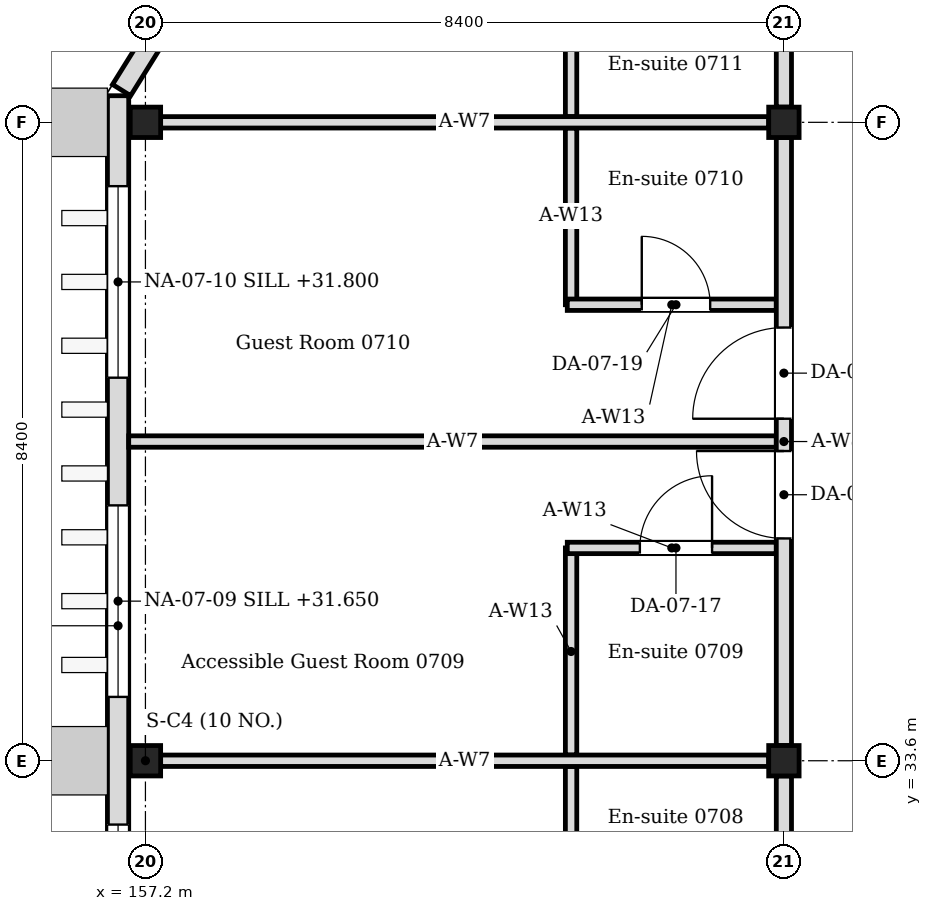
"""IFC4 building model, lengths in metres.
Left out: names, types, materials, properties, quantities, classifications, styles, units other than length and angle.
Written with IfcOpenShell. Run it as: python <this file> out.ifc"""

import sys

from ifc_helpers import new_model, si_unit, direction, frame, frame_2d, origin, origin_2d, place, context, subcontext, project, spatial, rectangle, i_section, extrude, element, fill, save


model = new_model("IFC4")
c1 = context("Model", 3, precision=1e-05, world=origin(), true_north=direction((0.0, 1.0)))
c2 = subcontext(c1, "Body", "Model", "MODEL_VIEW")
j1 = project(units=[si_unit("LENGTHUNIT", "METRE"), si_unit("PLANEANGLEUNIT", "RADIAN")], contexts=[c1])
p1 = place(None, origin())
s1 = spatial("IfcSite", under=j1, at=p1, CompositionType="ELEMENT")
p2 = place(p1, origin())
s2 = spatial("IfcBuilding", under=s1, at=p2, CompositionType="ELEMENT")
p3 = place(p2, frame((0.0, 0.0, 31.2)))
s3 = spatial("IfcBuildingStorey", under=s2, at=p3, CompositionType="ELEMENT", Elevation=31.2)
for number, where, z_axis, x_axis in (
    (1, (157.2, 33.6, 0.0), (0.0, 0.0, 1.0), (1.0, 0.0, 0.0)),
    (2, (157.2, 42.0, 0.0), (0.0, 0.0, 1.0), (1.0, 0.0, 0.0)),
    (3, (165.6, 33.6, 0.0), (0.0, 0.0, 1.0), (1.0, 0.0, 0.0)),
    (4, (165.6, 42.0, 0.0), (0.0, 0.0, 1.0), (1.0, 0.0, 0.0)),
):
    element("IfcColumn", number, at=place(p3, frame(where, z_axis=z_axis, x_axis=x_axis)), inside=s3, PredefinedType="COLUMN", context=c2, shape_type="SweptSolid", body=[
        extrude(i_section(OverallWidth=0.4, OverallDepth=0.4, WebThickness=0.013, FlangeThickness=0.021, FilletRadius=0.022, at=origin_2d()), origin(), (0.0, 0.0, 1.0), 4.2),
    ])
p4 = place(p3, frame((156.84, 16.45, 0.0), z_axis=(0.0, 0.0, 1.0), x_axis=(0.0, 1.0, 0.0)))
e5 = element("IfcWall", 5, at=p4, inside=s3, PredefinedType="SOLIDWALL", context=c2, shape_type="SweptSolid", body=[
    extrude(rectangle(XDim=25.9, YDim=0.28, at=frame_2d((12.95, 0.0))), origin(), (0.0, 0.0, 1.0), 4.05),
])
p5 = place(p4, frame((1.19, 0.0, 0.6)))
e6 = element("IfcOpeningElement", 6, at=p5, cuts=e5, PredefinedType="OPENING", context=c2, shape_type="SweptSolid", body=[
    extrude(rectangle(XDim=2.52, YDim=2.4, at=frame_2d((1.26, 1.2))), frame((0.0, 0.15, 0.0), z_axis=(0.0, -1.0, 0.0), x_axis=(1.0, 0.0, 0.0)), (0.0, 0.0, 1.0), 0.3),
])
p6 = place(p4, frame((5.39, 0.0, 0.6)))
e7 = element("IfcOpeningElement", 7, at=p6, cuts=e5, PredefinedType="OPENING", context=c2, shape_type="SweptSolid", body=[
    extrude(rectangle(XDim=2.52, YDim=2.4, at=frame_2d((1.26, 1.2))), frame((0.0, 0.15, 0.0), z_axis=(0.0, -1.0, 0.0), x_axis=(1.0, 0.0, 0.0)), (0.0, 0.0, 1.0), 0.3),
])
p7 = place(p4, frame((9.59, 0.0, 0.6)))
e8 = element("IfcOpeningElement", 8, at=p7, cuts=e5, PredefinedType="OPENING", context=c2, shape_type="SweptSolid", body=[
    extrude(rectangle(XDim=2.52, YDim=2.4, at=frame_2d((1.26, 1.2))), frame((0.0, 0.15, 0.0), z_axis=(0.0, -1.0, 0.0), x_axis=(1.0, 0.0, 0.0)), (0.0, 0.0, 1.0), 0.3),
])
p8 = place(p4, frame((13.79, 0.0, 0.6)))
e9 = element("IfcOpeningElement", 9, at=p8, cuts=e5, PredefinedType="OPENING", context=c2, shape_type="SweptSolid", body=[
    extrude(rectangle(XDim=2.52, YDim=2.4, at=frame_2d((1.26, 1.2))), frame((0.0, 0.15, 0.0), z_axis=(0.0, -1.0, 0.0), x_axis=(1.0, 0.0, 0.0)), (0.0, 0.0, 1.0), 0.3),
])
p9 = place(p4, frame((17.99, 0.0, 0.45)))
e10 = element("IfcOpeningElement", 10, at=p9, cuts=e5, PredefinedType="OPENING", context=c2, shape_type="SweptSolid", body=[
    extrude(rectangle(XDim=2.52, YDim=2.1, at=frame_2d((1.26, 1.05))), frame((0.0, 0.15, 0.0), z_axis=(0.0, -1.0, 0.0), x_axis=(1.0, 0.0, 0.0)), (0.0, 0.0, 1.0), 0.3),
])
p10 = place(p4, frame((22.19, 0.0, 0.6)))
e11 = element("IfcOpeningElement", 11, at=p10, cuts=e5, PredefinedType="OPENING", context=c2, shape_type="SweptSolid", body=[
    extrude(rectangle(XDim=2.52, YDim=2.4, at=frame_2d((1.26, 1.2))), frame((0.0, 0.15, 0.0), z_axis=(0.0, -1.0, 0.0), x_axis=(1.0, 0.0, 0.0)), (0.0, 0.0, 1.0), 0.3),
])
p11 = place(p3, frame((156.886, 42.424, 0.0), z_axis=(0.0, 0.0, 1.0), x_axis=(0.529018946142, 0.848610013271, 0.0)))
e12 = element("IfcWall", 12, at=p11, inside=s3, PredefinedType="SOLIDWALL", context=c2, shape_type="SweptSolid", body=[
    extrude(rectangle(XDim=4.144, YDim=0.28, at=frame_2d((2.072, 0.0))), origin(), (0.0, 0.0, 1.0), 4.05),
])
p12 = place(p11, frame((0.812, 0.0, 0.6)))
e13 = element("IfcOpeningElement", 13, at=p12, cuts=e12, PredefinedType="OPENING", context=c2, shape_type="SweptSolid", body=[
    extrude(rectangle(XDim=2.52, YDim=2.4, at=frame_2d((1.26, 1.2))), frame((0.0, 0.15, 0.0), z_axis=(0.0, -1.0, 0.0), x_axis=(1.0, 0.0, 0.0)), (0.0, 0.0, 1.0), 0.3),
])
p13 = place(p3, frame((162.8, 31.2, 0.0), z_axis=(0.0, 0.0, 1.0), x_axis=(0.0, 1.0, 0.0)))
e14 = element("IfcWall", 14, at=p13, inside=s3, PredefinedType="PARTITIONING", context=c2, shape_type="SweptSolid", body=[
    extrude(rectangle(XDim=2.325, YDim=0.15, at=frame_2d((1.163, 0.0))), origin(), (0.0, 0.0, 1.0), 4.05),
])
p14 = place(p3, frame((162.8, 33.675, 0.0), z_axis=(0.0, 0.0, 1.0), x_axis=(0.0, 1.0, 0.0)))
e15 = element("IfcWall", 15, at=p14, inside=s3, PredefinedType="PARTITIONING", context=c2, shape_type="SweptSolid", body=[
    extrude(rectangle(XDim=2.725, YDim=0.15, at=frame_2d((1.362, 0.0))), origin(), (0.0, 0.0, 1.0), 4.05),
])
p15 = place(p3, frame((162.75, 36.4, 0.0), z_axis=(0.0, 0.0, 1.0), x_axis=(1.0, 0.0, 0.0)))
e16 = element("IfcWall", 16, at=p15, inside=s3, PredefinedType="PARTITIONING", context=c2, shape_type="SweptSolid", body=[
    extrude(rectangle(XDim=2.75, YDim=0.15, at=frame_2d((1.375, 0.0))), origin(), (0.0, 0.0, 1.0), 4.05),
])
p16 = place(p15, frame((0.955, 0.0, 0.0)))
e17 = element("IfcOpeningElement", 17, at=p16, cuts=e16, PredefinedType="OPENING", context=c2, shape_type="SweptSolid", body=[
    extrude(rectangle(XDim=0.95, YDim=2.1, at=frame_2d((0.475, 1.05))), frame((0.0, 0.085, 0.0), z_axis=(0.0, -1.0, 0.0), x_axis=(1.0, 0.0, 0.0)), (0.0, 0.0, 1.0), 0.17),
])
p17 = place(p3, frame((162.8, 39.6, 0.0), z_axis=(0.0, 0.0, 1.0), x_axis=(0.0, 1.0, 0.0)))
e18 = element("IfcWall", 18, at=p17, inside=s3, PredefinedType="PARTITIONING", context=c2, shape_type="SweptSolid", body=[
    extrude(rectangle(XDim=2.325, YDim=0.15, at=frame_2d((1.163, 0.0))), origin(), (0.0, 0.0, 1.0), 4.05),
])
p18 = place(p3, frame((162.75, 39.6, 0.0), z_axis=(0.0, 0.0, 1.0), x_axis=(1.0, 0.0, 0.0)))
e19 = element("IfcWall", 19, at=p18, inside=s3, PredefinedType="PARTITIONING", context=c2, shape_type="SweptSolid", body=[
    extrude(rectangle(XDim=2.75, YDim=0.15, at=frame_2d((1.375, 0.0))), origin(), (0.0, 0.0, 1.0), 4.05),
])
p19 = place(p18, frame((0.98, 0.0, 0.0)))
e20 = element("IfcOpeningElement", 20, at=p19, cuts=e19, PredefinedType="OPENING", context=c2, shape_type="SweptSolid", body=[
    extrude(rectangle(XDim=0.9, YDim=2.1, at=frame_2d((0.45, 1.05))), frame((0.0, 0.085, 0.0), z_axis=(0.0, -1.0, 0.0), x_axis=(1.0, 0.0, 0.0)), (0.0, 0.0, 1.0), 0.17),
])
p20 = place(p3, frame((162.8, 42.075, 0.0), z_axis=(0.0, 0.0, 1.0), x_axis=(0.0, 1.0, 0.0)))
e21 = element("IfcWall", 21, at=p20, inside=s3, PredefinedType="PARTITIONING", context=c2, shape_type="SweptSolid", body=[
    extrude(rectangle(XDim=2.325, YDim=0.15, at=frame_2d((1.163, 0.0))), origin(), (0.0, 0.0, 1.0), 4.05),
])
for number, where, z_axis, x_axis in (
    (22, (157.4, 33.6, 0.0), (0.0, 0.0, 1.0), (1.0, 0.0, 0.0)),
    (23, (157.4, 42.0, 0.0), (0.0, 0.0, 1.0), (1.0, 0.0, 0.0)),
):
    element("IfcWall", number, at=place(p3, frame(where, z_axis=z_axis, x_axis=x_axis)), inside=s3, PredefinedType="PARTITIONING", context=c2, shape_type="SweptSolid", body=[
        extrude(rectangle(XDim=8.0, YDim=0.15, at=frame_2d((4.0, 0.0))), origin(), (0.0, 0.0, 1.0), 3.604),
    ])
p21 = place(p3, frame((156.98, 37.8, 0.0), z_axis=(0.0, 0.0, 1.0), x_axis=(1.0, 0.0, 0.0)))
e24 = element("IfcWall", 24, at=p21, inside=s3, PredefinedType="PARTITIONING", context=c2, shape_type="SweptSolid", body=[
    extrude(rectangle(XDim=8.52, YDim=0.15, at=frame_2d((4.26, 0.0))), origin(), (0.0, 0.0, 1.0), 3.604),
])
p22 = place(p3, frame((165.6, 25.4, 0.0), z_axis=(0.0, 0.0, 1.0), x_axis=(0.0, 1.0, 0.0)))
e25 = element("IfcWall", 25, at=p22, inside=s3, PredefinedType="PARTITIONING", context=c2, shape_type="SweptSolid", body=[
    extrude(rectangle(XDim=8.0, YDim=0.2, at=frame_2d((4.0, 0.0))), origin(), (0.0, 0.0, 1.0), 3.45),
])
p23 = place(p22, frame((2.5, 0.0, 0.0)))
e26 = element("IfcOpeningElement", 26, at=p23, cuts=e25, PredefinedType="OPENING", context=c2, shape_type="SweptSolid", body=[
    extrude(rectangle(XDim=1.2, YDim=2.1, at=frame_2d((0.6, 1.05))), frame((0.0, 0.11, 0.0), z_axis=(0.0, -1.0, 0.0), x_axis=(1.0, 0.0, 0.0)), (0.0, 0.0, 1.0), 0.22),
])
p24 = place(p22, frame((4.3, 0.0, 0.0)))
e27 = element("IfcOpeningElement", 27, at=p24, cuts=e25, PredefinedType="OPENING", context=c2, shape_type="SweptSolid", body=[
    extrude(rectangle(XDim=1.2, YDim=2.1, at=frame_2d((0.6, 1.05))), frame((0.0, 0.11, 0.0), z_axis=(0.0, -1.0, 0.0), x_axis=(1.0, 0.0, 0.0)), (0.0, 0.0, 1.0), 0.22),
])
p25 = place(p3, frame((165.6, 33.8, 0.0), z_axis=(0.0, 0.0, 1.0), x_axis=(0.0, 1.0, 0.0)))
e28 = element("IfcWall", 28, at=p25, inside=s3, PredefinedType="PARTITIONING", context=c2, shape_type="SweptSolid", body=[
    extrude(rectangle(XDim=8.0, YDim=0.2, at=frame_2d((4.0, 0.0))), origin(), (0.0, 0.0, 1.0), 3.45),
])
p26 = place(p25, frame((2.725, 0.0, 0.0)))
e29 = element("IfcOpeningElement", 29, at=p26, cuts=e28, PredefinedType="OPENING", context=c2, shape_type="SweptSolid", body=[
    extrude(rectangle(XDim=1.15, YDim=2.1, at=frame_2d((0.575, 1.05))), frame((0.0, 0.11, 0.0), z_axis=(0.0, -1.0, 0.0), x_axis=(1.0, 0.0, 0.0)), (0.0, 0.0, 1.0), 0.22),
])
p27 = place(p25, frame((4.3, 0.0, 0.0)))
e30 = element("IfcOpeningElement", 30, at=p27, cuts=e28, PredefinedType="OPENING", context=c2, shape_type="SweptSolid", body=[
    extrude(rectangle(XDim=1.2, YDim=2.1, at=frame_2d((0.6, 1.05))), frame((0.0, 0.11, 0.0), z_axis=(0.0, -1.0, 0.0), x_axis=(1.0, 0.0, 0.0)), (0.0, 0.0, 1.0), 0.22),
])
p28 = place(p3, frame((165.6, 42.2, 0.0), z_axis=(0.0, 0.0, 1.0), x_axis=(0.0, 1.0, 0.0)))
e31 = element("IfcWall", 31, at=p28, inside=s3, PredefinedType="PARTITIONING", context=c2, shape_type="SweptSolid", body=[
    extrude(rectangle(XDim=8.0, YDim=0.2, at=frame_2d((4.0, 0.0))), origin(), (0.0, 0.0, 1.0), 3.45),
])
p29 = place(p28, frame((2.5, 0.0, 0.0)))
e32 = element("IfcOpeningElement", 32, at=p29, cuts=e31, PredefinedType="OPENING", context=c2, shape_type="SweptSolid", body=[
    extrude(rectangle(XDim=1.2, YDim=2.1, at=frame_2d((0.6, 1.05))), frame((0.0, 0.11, 0.0), z_axis=(0.0, -1.0, 0.0), x_axis=(1.0, 0.0, 0.0)), (0.0, 0.0, 1.0), 0.22),
])
p30 = place(p28, frame((4.3, 0.0, 0.0)))
e33 = element("IfcOpeningElement", 33, at=p30, cuts=e31, PredefinedType="OPENING", context=c2, shape_type="SweptSolid", body=[
    extrude(rectangle(XDim=1.2, YDim=2.1, at=frame_2d((0.6, 1.05))), frame((0.0, 0.11, 0.0), z_axis=(0.0, -1.0, 0.0), x_axis=(1.0, 0.0, 0.0)), (0.0, 0.0, 1.0), 0.22),
])
p31 = place(p8, origin())
e34 = element("IfcWindow", 34, at=p31, inside=s3, PartitioningType="SINGLE_PANEL", PredefinedType="WINDOW", context=c2, shape_type="SweptSolid", body=[
    extrude(rectangle(XDim=2.52, YDim=2.4, at=frame_2d((1.26, 1.2))), frame((0.0, 0.03, 0.0), z_axis=(0.0, -1.0, 0.0), x_axis=(1.0, 0.0, 0.0)), (0.0, 0.0, 1.0), 0.06),
])
fill(e9, e34)
p32 = place(p9, origin())
e35 = element("IfcWindow", 35, at=p32, inside=s3, PartitioningType="SINGLE_PANEL", PredefinedType="WINDOW", context=c2, shape_type="SweptSolid", body=[
    extrude(rectangle(XDim=2.52, YDim=2.1, at=frame_2d((1.26, 1.05))), frame((0.0, 0.03, 0.0), z_axis=(0.0, -1.0, 0.0), x_axis=(1.0, 0.0, 0.0)), (0.0, 0.0, 1.0), 0.06),
])
fill(e10, e35)
p33 = place(p10, origin())
e36 = element("IfcWindow", 36, at=p33, inside=s3, PartitioningType="SINGLE_PANEL", PredefinedType="WINDOW", context=c2, shape_type="SweptSolid", body=[
    extrude(rectangle(XDim=2.52, YDim=2.4, at=frame_2d((1.26, 1.2))), frame((0.0, 0.03, 0.0), z_axis=(0.0, -1.0, 0.0), x_axis=(1.0, 0.0, 0.0)), (0.0, 0.0, 1.0), 0.06),
])
fill(e11, e36)
p34 = place(p16, origin())
e37 = element("IfcDoor", 37, at=p34, inside=s3, OperationType="SINGLE_SWING_RIGHT", PredefinedType="DOOR", context=c2, shape_type="SweptSolid", body=[
    extrude(rectangle(XDim=0.95, YDim=2.1, at=frame_2d((0.475, 1.05))), frame((0.0, 0.025, 0.0), z_axis=(0.0, -1.0, 0.0), x_axis=(1.0, 0.0, 0.0)), (0.0, 0.0, 1.0), 0.05),
])
fill(e17, e37)
p35 = place(p26, origin())
e38 = element("IfcDoor", 38, at=p35, inside=s3, OperationType="SINGLE_SWING_RIGHT", PredefinedType="DOOR", context=c2, shape_type="SweptSolid", body=[
    extrude(rectangle(XDim=1.15, YDim=2.1, at=frame_2d((0.575, 1.05))), frame((0.0, 0.025, 0.0), z_axis=(0.0, -1.0, 0.0), x_axis=(1.0, 0.0, 0.0)), (0.0, 0.0, 1.0), 0.05),
])
fill(e29, e38)
p36 = place(p19, origin())
e39 = element("IfcDoor", 39, at=p36, inside=s3, OperationType="SINGLE_SWING_LEFT", PredefinedType="DOOR", context=c2, shape_type="SweptSolid", body=[
    extrude(rectangle(XDim=0.9, YDim=2.1, at=frame_2d((0.45, 1.05))), frame((0.0, 0.025, 0.0), z_axis=(0.0, -1.0, 0.0), x_axis=(1.0, 0.0, 0.0)), (0.0, 0.0, 1.0), 0.05),
])
fill(e20, e39)
p37 = place(p27, origin())
e40 = element("IfcDoor", 40, at=p37, inside=s3, OperationType="SINGLE_SWING_LEFT", PredefinedType="DOOR", context=c2, shape_type="SweptSolid", body=[
    extrude(rectangle(XDim=1.2, YDim=2.1, at=frame_2d((0.6, 1.05))), frame((0.0, 0.025, 0.0), z_axis=(0.0, -1.0, 0.0), x_axis=(1.0, 0.0, 0.0)), (0.0, 0.0, 1.0), 0.05),
])
fill(e30, e40)
save(model, sys.argv[1])
